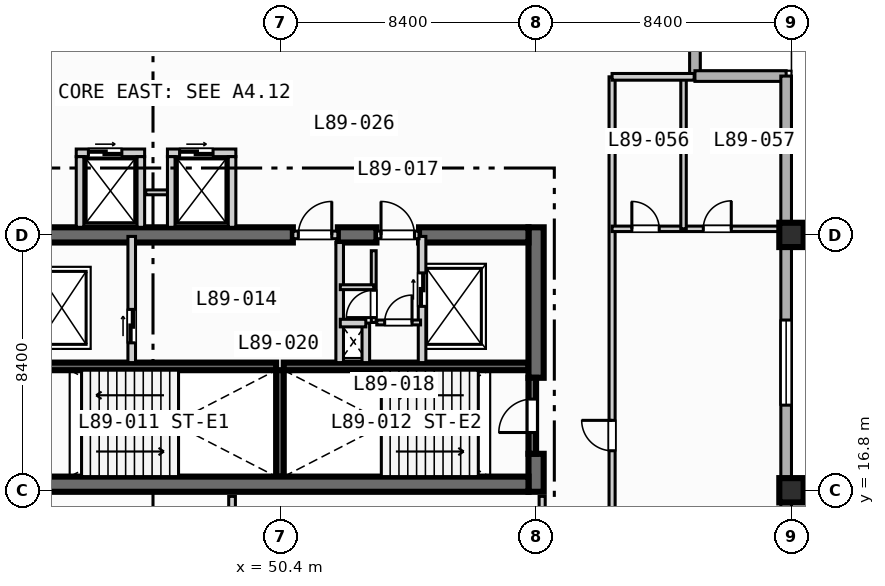
"""IFC4 building model, lengths in metres.
Left out: names, types, materials, properties, quantities, classifications, styles, units other than length and angle.
Written with IfcOpenShell. Run it as: python <this file> out.ifc"""

import sys

from ifc_helpers import new_model, si_unit, direction, frame, frame_2d, origin, origin_2d, place, context, subcontext, project, spatial, rectangle, extrude, element, fill, save


model = new_model("IFC4")
c1 = context("Model", 3, precision=1e-05, world=origin(), true_north=direction((0.0, 1.0)))
c2 = subcontext(c1, "Body", "Model", "MODEL_VIEW")
j1 = project(units=[si_unit("LENGTHUNIT", "METRE"), si_unit("PLANEANGLEUNIT", "RADIAN")], contexts=[c1])
p1 = place(None, origin())
s1 = spatial("IfcSite", under=j1, at=p1, CompositionType="ELEMENT")
p2 = place(p1, origin())
s2 = spatial("IfcBuilding", under=s1, at=p2, CompositionType="ELEMENT")
p3 = place(p2, frame((0.0, 0.0, 359.6)))
s3 = spatial("IfcBuildingStorey", under=s2, at=p3, CompositionType="ELEMENT", Elevation=359.6)
for number, where, z_axis, x_axis in (
    (1, (42.2, 20.875, 0.0), (0.0, 0.0, 1.0), (1.0, 0.0, 0.0)),
    (2, (50.5, 20.875, 0.0), (0.0, 0.0, 1.0), (1.0, 0.0, 0.0)),
):
    element("IfcWall", number, at=place(p3, frame(where, z_axis=z_axis, x_axis=x_axis)), inside=s3, PredefinedType="SOLIDWALL", context=c2, shape_type="SweptSolid", body=[
        extrude(rectangle(XDim=8.05, YDim=0.25, at=frame_2d((4.025, 0.0))), origin(), (0.0, 0.0, 1.0), 3.9),
    ])
p4 = place(p3, frame((50.375, 17.25, 0.0), z_axis=(0.0, 0.0, 1.0), x_axis=(0.0, 1.0, 0.0)))
e3 = element("IfcWall", 3, at=p4, inside=s3, PredefinedType="SOLIDWALL", context=c2, shape_type="SweptSolid", body=[
    extrude(rectangle(XDim=3.5, YDim=0.25, at=frame_2d((1.75, 0.0))), origin(), (0.0, 0.0, 1.0), 3.9),
])
p5 = place(p3, frame((58.8, 16.75, 0.0), z_axis=(0.0, 0.0, 1.0), x_axis=(0.0, 1.0, 0.0)))
e4 = element("IfcWall", 4, at=p5, inside=s3, PredefinedType="SHEAR", context=c2, shape_type="SweptSolid", body=[
    extrude(rectangle(XDim=1.25, YDim=0.5, at=frame_2d((0.625, 0.0))), origin(), (0.0, 0.0, 1.0), 3.9),
])
p6 = place(p3, frame((58.8, 20.5, 0.0), z_axis=(0.0, 0.0, 1.0), x_axis=(0.0, 1.0, 0.0)))
e5 = element("IfcWall", 5, at=p6, inside=s3, PredefinedType="SHEAR", context=c2, shape_type="SweptSolid", body=[
    extrude(rectangle(XDim=4.95, YDim=0.5, at=frame_2d((2.475, 0.0))), origin(), (0.0, 0.0, 1.0), 3.9),
])
p7 = place(p3, frame((42.2, 17.0, 0.0), z_axis=(0.0, 0.0, 1.0), x_axis=(1.0, 0.0, 0.0)))
e6 = element("IfcWall", 6, at=p7, inside=s3, PredefinedType="SHEAR", context=c2, shape_type="SweptSolid", body=[
    extrude(rectangle(XDim=16.35, YDim=0.5, at=frame_2d((8.175, 0.0))), origin(), (0.0, 0.0, 1.0), 3.9),
])
p8 = place(p3, frame((42.2, 25.2, 0.0), z_axis=(0.0, 0.0, 1.0), x_axis=(1.0, 0.0, 0.0)))
e7 = element("IfcWall", 7, at=p8, inside=s3, PredefinedType="SHEAR", context=c2, shape_type="SweptSolid", body=[
    extrude(rectangle(XDim=8.6, YDim=0.5, at=frame_2d((4.3, 0.0))), origin(), (0.0, 0.0, 1.0), 3.9),
])
p9 = place(p3, frame((52.28, 25.2, 0.0), z_axis=(0.0, 0.0, 1.0), x_axis=(1.0, 0.0, 0.0)))
e8 = element("IfcWall", 8, at=p9, inside=s3, PredefinedType="SHEAR", context=c2, shape_type="SweptSolid", body=[
    extrude(rectangle(XDim=1.27, YDim=0.5, at=frame_2d((0.635, 0.0))), origin(), (0.0, 0.0, 1.0), 3.9),
])
p10 = place(p3, frame((54.95, 25.2, 0.0), z_axis=(0.0, 0.0, 1.0), x_axis=(1.0, 0.0, 0.0)))
e9 = element("IfcWall", 9, at=p10, inside=s3, PredefinedType="SHEAR", context=c2, shape_type="SweptSolid", body=[
    extrude(rectangle(XDim=3.6, YDim=0.5, at=frame_2d((1.8, 0.0))), origin(), (0.0, 0.0, 1.0), 3.9),
])
for number, where, z_axis, x_axis in (
    (10, (67.2, 16.8, 0.0), (0.0, 0.0, 1.0), (1.0, 0.0, 0.0)),
    (11, (67.2, 25.2, 0.0), (0.0, 0.0, 1.0), (1.0, 0.0, 0.0)),
):
    element("IfcColumn", number, at=place(p3, frame(where, z_axis=z_axis, x_axis=x_axis)), inside=s3, PredefinedType="COLUMN", context=c2, shape_type="SweptSolid", body=[
        extrude(rectangle(XDim=0.8, YDim=0.8, at=origin_2d()), origin(), (0.0, 0.0, 1.0), 4.2),
    ])
for number, where, z_axis, x_axis in (
    (12, (64.025, 33.425, 0.0), (0.0, 0.0, 1.0), (0.0, -1.0, 0.0)),
    (13, (64.025, 30.425, 0.0), (0.0, 0.0, 1.0), (1.0, 0.0, 0.0)),
):
    element("IfcWall", number, at=place(p3, frame(where, z_axis=z_axis, x_axis=x_axis)), inside=s3, PredefinedType="STANDARD", context=c2, shape_type="SweptSolid", body=[
        extrude(rectangle(XDim=3.0, YDim=0.35, at=frame_2d((1.5, 0.0))), origin(), (0.0, 0.0, 1.0), 3.9),
    ])
p11 = place(p3, frame((67.025, 30.425, 0.0), z_axis=(0.0, 0.0, 1.0), x_axis=(0.0, -1.0, 0.0)))
e14 = element("IfcWall", 14, at=p11, inside=s3, PredefinedType="STANDARD", context=c2, shape_type="SweptSolid", body=[
    extrude(rectangle(XDim=18.85, YDim=0.35, at=frame_2d((9.425, 0.0))), origin(), (0.0, 0.0, 1.0), 3.3),
])
p12 = place(p11, frame((8.025, 0.0, 0.85)))
e15 = element("IfcOpeningElement", 15, at=p12, cuts=e14, PredefinedType="OPENING", context=c2, shape_type="SweptSolid", body=[
    extrude(rectangle(XDim=2.8, YDim=2.1, at=frame_2d((1.4, 1.05))), frame((0.0, 0.185, 0.0), z_axis=(0.0, -1.0, 0.0), x_axis=(1.0, 0.0, 0.0)), (0.0, 0.0, 1.0), 0.37),
])
p13 = place(p3, frame((58.675, 18.0, 0.0), z_axis=(0.0, 0.0, 1.0), x_axis=(0.0, 1.0, 0.0)))
e16 = element("IfcWall", 16, at=p13, inside=s3, PredefinedType="SOLIDWALL", context=c2, shape_type="SweptSolid", body=[
    extrude(rectangle(XDim=2.5, YDim=0.25, at=frame_2d((1.25, 0.0))), origin(), (0.0, 0.0, 1.0), 3.9),
])
p14 = place(p13, frame((0.7, 0.0, 0.0)))
e17 = element("IfcOpeningElement", 17, at=p14, cuts=e16, PredefinedType="OPENING", context=c2, shape_type="SweptSolid", body=[
    extrude(rectangle(XDim=1.1, YDim=2.15, at=frame_2d((0.55, 1.075))), frame((0.0, 0.135, 0.0), z_axis=(0.0, -1.0, 0.0), x_axis=(1.0, 0.0, 0.0)), (0.0, 0.0, 1.0), 0.27),
])
p15 = place(p3, frame((45.5, 21.0, 0.0), z_axis=(0.0, 0.0, 1.0), x_axis=(0.0, 1.0, 0.0)))
e18 = element("IfcWall", 18, at=p15, inside=s3, PredefinedType="SOLIDWALL", context=c2, shape_type="SweptSolid", body=[
    extrude(rectangle(XDim=4.15, YDim=0.25, at=frame_2d((2.075, 0.0))), origin(), (0.0, 0.0, 1.0), 3.9),
])
p16 = place(p15, frame((0.65, 0.0, 0.0)))
e19 = element("IfcOpeningElement", 19, at=p16, cuts=e18, PredefinedType="OPENING", context=c2, shape_type="SweptSolid", body=[
    extrude(rectangle(XDim=1.1, YDim=2.15, at=frame_2d((0.55, 1.075))), frame((0.0, 0.135, 0.0), z_axis=(0.0, -1.0, 0.0), x_axis=(1.0, 0.0, 0.0)), (0.0, 0.0, 1.0), 0.27),
])
p17 = place(p3, frame((50.8, 25.2, 0.0), z_axis=(0.0, 0.0, 1.0), x_axis=(1.0, 0.0, 0.0)))
e20 = element("IfcWall", 20, at=p17, inside=s3, PredefinedType="SOLIDWALL", context=c2, shape_type="SweptSolid", body=[
    extrude(rectangle(XDim=1.48, YDim=0.25, at=frame_2d((0.74, 0.0))), origin(), (0.0, 0.0, 1.0), 3.9),
])
p18 = place(p17, frame((0.18, 0.0, 0.0)))
e21 = element("IfcOpeningElement", 21, at=p18, cuts=e20, PredefinedType="OPENING", context=c2, shape_type="SweptSolid", body=[
    extrude(rectangle(XDim=1.1, YDim=2.15, at=frame_2d((0.55, 1.075))), frame((0.0, 0.135, 0.0), z_axis=(0.0, -1.0, 0.0), x_axis=(1.0, 0.0, 0.0)), (0.0, 0.0, 1.0), 0.27),
])
p19 = place(p3, frame((52.34, 21.0, 0.0), z_axis=(0.0, 0.0, 1.0), x_axis=(0.0, 1.0, 0.0)))
e22 = element("IfcWall", 22, at=p19, inside=s3, PredefinedType="SOLIDWALL", context=c2, shape_type="SweptSolid", body=[
    extrude(rectangle(XDim=3.95, YDim=0.25, at=frame_2d((1.975, 0.0))), origin(), (0.0, 0.0, 1.0), 3.9),
])
p20 = place(p3, frame((55.05, 21.0, 0.0), z_axis=(0.0, 0.0, 1.0), x_axis=(0.0, 1.0, 0.0)))
e23 = element("IfcWall", 23, at=p20, inside=s3, PredefinedType="SOLIDWALL", context=c2, shape_type="SweptSolid", body=[
    extrude(rectangle(XDim=4.15, YDim=0.25, at=frame_2d((2.075, 0.0))), origin(), (0.0, 0.0, 1.0), 3.9),
])
p21 = place(p20, frame((1.85, 0.0, 0.0)))
e24 = element("IfcOpeningElement", 24, at=p21, cuts=e23, PredefinedType="OPENING", context=c2, shape_type="SweptSolid", body=[
    extrude(rectangle(XDim=1.1, YDim=2.15, at=frame_2d((0.55, 1.075))), frame((0.0, 0.135, 0.0), z_axis=(0.0, -1.0, 0.0), x_axis=(1.0, 0.0, 0.0)), (0.0, 0.0, 1.0), 0.27),
])
p22 = place(p3, frame((53.55, 25.2, 0.0), z_axis=(0.0, 0.0, 1.0), x_axis=(1.0, 0.0, 0.0)))
e25 = element("IfcWall", 25, at=p22, inside=s3, PredefinedType="SOLIDWALL", context=c2, shape_type="SweptSolid", body=[
    extrude(rectangle(XDim=1.4, YDim=0.25, at=frame_2d((0.7, 0.0))), origin(), (0.0, 0.0, 1.0), 3.9),
])
p23 = place(p22, frame((0.15, 0.0, 0.0)))
e26 = element("IfcOpeningElement", 26, at=p23, cuts=e25, PredefinedType="OPENING", context=c2, shape_type="SweptSolid", body=[
    extrude(rectangle(XDim=1.1, YDim=2.15, at=frame_2d((0.55, 1.075))), frame((0.0, 0.135, 0.0), z_axis=(0.0, -1.0, 0.0), x_axis=(1.0, 0.0, 0.0)), (0.0, 0.0, 1.0), 0.27),
])
p24 = place(p3, frame((53.2, 21.0, 0.0), z_axis=(0.0, 0.0, 1.0), x_axis=(0.0, 1.0, 0.0)))
e27 = element("IfcWall", 27, at=p24, inside=s3, PredefinedType="SOLIDWALL", context=c2, shape_type="SweptSolid", body=[
    extrude(rectangle(XDim=1.3, YDim=0.25, at=frame_2d((0.65, 0.0))), origin(), (0.0, 0.0, 1.0), 3.9),
])
p25 = place(p3, frame((52.36, 22.3, 0.0), z_axis=(0.0, 0.0, 1.0), x_axis=(1.0, 0.0, 0.0)))
e28 = element("IfcWall", 28, at=p25, inside=s3, PredefinedType="SOLIDWALL", context=c2, shape_type="SweptSolid", body=[
    extrude(rectangle(XDim=0.84, YDim=0.25, at=frame_2d((0.42, 0.0))), origin(), (0.0, 0.0, 1.0), 3.9),
])
p26 = place(p3, frame((53.56, 22.32, 0.0), z_axis=(0.0, 0.0, 1.0), x_axis=(1.0, 0.0, 0.0)))
e29 = element("IfcWall", 29, at=p26, inside=s3, PredefinedType="PARTITIONING", context=c2, shape_type="SweptSolid", body=[
    extrude(rectangle(XDim=1.44, YDim=0.16, at=frame_2d((0.72, 0.0))), origin(), (0.0, 0.0, 1.0), 3.9),
])
p27 = place(p26, frame((0.26, 0.0, 0.0)))
e30 = element("IfcOpeningElement", 30, at=p27, cuts=e29, PredefinedType="OPENING", context=c2, shape_type="SweptSolid", body=[
    extrude(rectangle(XDim=0.9, YDim=2.1, at=frame_2d((0.45, 1.05))), frame((0.0, 0.09, 0.0), z_axis=(0.0, -1.0, 0.0), x_axis=(1.0, 0.0, 0.0)), (0.0, 0.0, 1.0), 0.18),
])
p28 = place(p3, frame((53.46, 22.32, 0.0), z_axis=(0.0, 0.0, 1.0), x_axis=(0.0, 1.0, 0.0)))
e31 = element("IfcWall", 31, at=p28, inside=s3, PredefinedType="PARTITIONING", context=c2, shape_type="SweptSolid", body=[
    extrude(rectangle(XDim=2.36, YDim=0.16, at=frame_2d((1.18, 0.0))), origin(), (0.0, 0.0, 1.0), 3.9),
])
p29 = place(p28, frame((0.16, 0.0, 0.0)))
e32 = element("IfcOpeningElement", 32, at=p29, cuts=e31, PredefinedType="OPENING", context=c2, shape_type="SweptSolid", body=[
    extrude(rectangle(XDim=0.9, YDim=2.1, at=frame_2d((0.45, 1.05))), frame((0.0, 0.09, 0.0), z_axis=(0.0, -1.0, 0.0), x_axis=(1.0, 0.0, 0.0)), (0.0, 0.0, 1.0), 0.18),
])
p30 = place(p3, frame((52.36, 23.48, 0.0), z_axis=(0.0, 0.0, 1.0), x_axis=(1.0, 0.0, 0.0)))
e33 = element("IfcWall", 33, at=p30, inside=s3, PredefinedType="PARTITIONING", context=c2, shape_type="SweptSolid", body=[
    extrude(rectangle(XDim=1.1, YDim=0.16, at=frame_2d((0.55, 0.0))), origin(), (0.0, 0.0, 1.0), 3.9),
])
p31 = place(p3, frame((43.675, 27.9, 0.0), z_axis=(0.0, 0.0, 1.0), x_axis=(1.0, 0.0, 0.0)))
e34 = element("IfcWall", 34, at=p31, inside=s3, PredefinedType="SOLIDWALL", context=c2, shape_type="SweptSolid", body=[
    extrude(rectangle(XDim=2.25, YDim=0.25, at=frame_2d((1.125, 0.0))), origin(), (0.0, 0.0, 1.0), 3.9),
])
p32 = place(p31, frame((0.4, 0.0, 0.0)))
e35 = element("IfcOpeningElement", 35, at=p32, cuts=e34, PredefinedType="OPENING", context=c2, shape_type="SweptSolid", body=[
    extrude(rectangle(XDim=1.1, YDim=2.15, at=frame_2d((0.55, 1.075))), frame((0.0, 0.135, 0.0), z_axis=(0.0, -1.0, 0.0), x_axis=(1.0, 0.0, 0.0)), (0.0, 0.0, 1.0), 0.27),
])
for number, where, z_axis, x_axis in (
    (36, (43.8, 25.45, 0.0), (0.0, 0.0, 1.0), (0.0, 1.0, 0.0)),
    (37, (45.8, 25.45, 0.0), (0.0, 0.0, 1.0), (0.0, 1.0, 0.0)),
):
    element("IfcWall", number, at=place(p3, frame(where, z_axis=z_axis, x_axis=x_axis)), inside=s3, PredefinedType="SOLIDWALL", context=c2, shape_type="SweptSolid", body=[
        extrude(rectangle(XDim=2.325, YDim=0.25, at=frame_2d((1.163, 0.0))), origin(), (0.0, 0.0, 1.0), 3.9),
    ])
p33 = place(p3, frame((45.96, 26.6, 0.0), z_axis=(0.0, 0.0, 1.0), x_axis=(1.0, 0.0, 0.0)))
e38 = element("IfcWall", 38, at=p33, inside=s3, PredefinedType="PARTITIONING", context=c2, shape_type="SweptSolid", body=[
    extrude(rectangle(XDim=0.88, YDim=0.16, at=frame_2d((0.44, 0.0))), origin(), (0.0, 0.0, 1.0), 3.9),
])
p34 = place(p3, frame((46.675, 27.9, 0.0), z_axis=(0.0, 0.0, 1.0), x_axis=(1.0, 0.0, 0.0)))
e39 = element("IfcWall", 39, at=p34, inside=s3, PredefinedType="SOLIDWALL", context=c2, shape_type="SweptSolid", body=[
    extrude(rectangle(XDim=2.25, YDim=0.25, at=frame_2d((1.125, 0.0))), origin(), (0.0, 0.0, 1.0), 3.9),
])
p35 = place(p34, frame((0.4, 0.0, 0.0)))
e40 = element("IfcOpeningElement", 40, at=p35, cuts=e39, PredefinedType="OPENING", context=c2, shape_type="SweptSolid", body=[
    extrude(rectangle(XDim=1.1, YDim=2.15, at=frame_2d((0.55, 1.075))), frame((0.0, 0.135, 0.0), z_axis=(0.0, -1.0, 0.0), x_axis=(1.0, 0.0, 0.0)), (0.0, 0.0, 1.0), 0.27),
])
for number, where, z_axis, x_axis in (
    (41, (46.8, 25.45, 0.0), (0.0, 0.0, 1.0), (0.0, 1.0, 0.0)),
    (42, (48.8, 25.45, 0.0), (0.0, 0.0, 1.0), (0.0, 1.0, 0.0)),
):
    element("IfcWall", number, at=place(p3, frame(where, z_axis=z_axis, x_axis=x_axis)), inside=s3, PredefinedType="SOLIDWALL", context=c2, shape_type="SweptSolid", body=[
        extrude(rectangle(XDim=2.325, YDim=0.25, at=frame_2d((1.163, 0.0))), origin(), (0.0, 0.0, 1.0), 3.9),
    ])
p36 = place(p3, frame((59.0, 8.65, 0.0), z_axis=(0.0, 0.0, 1.0), x_axis=(0.0, 1.0, 0.0)))
e43 = element("IfcWall", 43, at=p36, inside=s3, PredefinedType="PARTITIONING", context=c2, shape_type="SweptSolid", body=[
    extrude(rectangle(XDim=7.95, YDim=0.2, at=frame_2d((3.975, 0.0))), origin(), (0.0, 0.0, 1.0), 3.3),
])
p37 = place(p36, frame((2.2, 0.0, 0.0)))
e44 = element("IfcOpeningElement", 44, at=p37, cuts=e43, PredefinedType="OPENING", context=c2, shape_type="SweptSolid", body=[
    extrude(rectangle(XDim=0.92, YDim=2.1, at=frame_2d((0.46, 1.05))), frame((0.0, 0.11, 0.0), z_axis=(0.0, -1.0, 0.0), x_axis=(1.0, 0.0, 0.0)), (0.0, 0.0, 1.0), 0.22),
])
p38 = place(p3, frame((48.8, 8.65, 0.0), z_axis=(0.0, 0.0, 1.0), x_axis=(0.0, 1.0, 0.0)))
e45 = element("IfcWall", 45, at=p38, inside=s3, PredefinedType="PARTITIONING", context=c2, shape_type="SweptSolid", body=[
    extrude(rectangle(XDim=7.95, YDim=0.22, at=frame_2d((3.975, 0.0))), origin(), (0.0, 0.0, 1.0), 3.9),
])
p39 = place(p3, frame((61.3, 11.6, 0.0), z_axis=(0.0, 0.0, 1.0), x_axis=(0.0, 1.0, 0.0)))
e46 = element("IfcWall", 46, at=p39, inside=s3, PredefinedType="PARTITIONING", context=c2, shape_type="SweptSolid", body=[
    extrude(rectangle(XDim=18.8, YDim=0.2, at=frame_2d((9.4, 0.0))), origin(), (0.0, 0.0, 1.0), 3.9),
])
p40 = place(p39, frame((6.5, 0.0, 0.0)))
e47 = element("IfcOpeningElement", 47, at=p40, cuts=e46, PredefinedType="OPENING", context=c2, shape_type="SweptSolid", body=[
    extrude(rectangle(XDim=1.0, YDim=2.15, at=frame_2d((0.5, 1.075))), frame((0.0, 0.11, 0.0), z_axis=(0.0, -1.0, 0.0), x_axis=(1.0, 0.0, 0.0)), (0.0, 0.0, 1.0), 0.22),
])
p41 = place(p3, frame((61.3, 25.4, 0.0), z_axis=(0.0, 0.0, 1.0), x_axis=(1.0, 0.0, 0.0)))
e48 = element("IfcWall", 48, at=p41, inside=s3, PredefinedType="PLUMBINGWALL", context=c2, shape_type="SweptSolid", body=[
    extrude(rectangle(XDim=5.5, YDim=0.18, at=frame_2d((2.75, 0.0))), origin(), (0.0, 0.0, 1.0), 2.9),
])
p42 = place(p41, frame((0.65, 0.0, 0.0)))
e49 = element("IfcOpeningElement", 49, at=p42, cuts=e48, PredefinedType="OPENING", context=c2, shape_type="SweptSolid", body=[
    extrude(rectangle(XDim=0.9, YDim=2.1, at=frame_2d((0.45, 1.05))), frame((0.0, 0.1, 0.0), z_axis=(0.0, -1.0, 0.0), x_axis=(1.0, 0.0, 0.0)), (0.0, 0.0, 1.0), 0.2),
])
p43 = place(p41, frame((3.0, 0.0, 0.0)))
e50 = element("IfcOpeningElement", 50, at=p43, cuts=e48, PredefinedType="OPENING", context=c2, shape_type="SweptSolid", body=[
    extrude(rectangle(XDim=0.92, YDim=2.1, at=frame_2d((0.46, 1.05))), frame((0.0, 0.1, 0.0), z_axis=(0.0, -1.0, 0.0), x_axis=(1.0, 0.0, 0.0)), (0.0, 0.0, 1.0), 0.2),
])
p44 = place(p3, frame((63.65, 25.4, 0.0), z_axis=(0.0, 0.0, 1.0), x_axis=(0.0, 1.0, 0.0)))
e51 = element("IfcWall", 51, at=p44, inside=s3, PredefinedType="PLUMBINGWALL", context=c2, shape_type="SweptSolid", body=[
    extrude(rectangle(XDim=5.0, YDim=0.18, at=frame_2d((2.5, 0.0))), origin(), (0.0, 0.0, 1.0), 3.9),
])
p45 = place(p3, frame((61.3, 30.4, 0.0), z_axis=(0.0, 0.0, 1.0), x_axis=(1.0, 0.0, 0.0)))
e52 = element("IfcWall", 52, at=p45, inside=s3, PredefinedType="PARTITIONING", context=c2, shape_type="SweptSolid", body=[
    extrude(rectangle(XDim=2.7, YDim=0.22, at=frame_2d((1.35, 0.0))), origin(), (0.0, 0.0, 1.0), 3.9),
])
p46 = place(p12, origin())
e53 = element("IfcWindow", 53, at=p46, inside=s3, PartitioningType="SINGLE_PANEL", PredefinedType="WINDOW", context=c2, shape_type="SweptSolid", body=[
    extrude(rectangle(XDim=2.8, YDim=2.1, at=frame_2d((1.4, 1.05))), frame((0.0, 0.03, 0.0), z_axis=(0.0, -1.0, 0.0), x_axis=(1.0, 0.0, 0.0)), (0.0, 0.0, 1.0), 0.06),
])
fill(e15, e53)
p47 = place(p14, origin())
e54 = element("IfcDoor", 54, at=p47, inside=s3, OperationType="SINGLE_SWING_LEFT", PredefinedType="DOOR", context=c2, shape_type="SweptSolid", body=[
    extrude(rectangle(XDim=1.1, YDim=2.15, at=frame_2d((0.55, 1.075))), frame((0.0, 0.025, 0.0), z_axis=(0.0, -1.0, 0.0), x_axis=(1.0, 0.0, 0.0)), (0.0, 0.0, 1.0), 0.05),
])
fill(e17, e54)
p48 = place(p16, origin())
e55 = element("IfcDoor", 55, at=p48, inside=s3, OperationType="SLIDING_TO_LEFT", PredefinedType="DOOR", context=c2, shape_type="SweptSolid", body=[
    extrude(rectangle(XDim=1.1, YDim=2.15, at=frame_2d((0.55, 1.075))), frame((0.0, 0.025, 0.0), z_axis=(0.0, -1.0, 0.0), x_axis=(1.0, 0.0, 0.0)), (0.0, 0.0, 1.0), 0.05),
])
fill(e19, e55)
p49 = place(p18, origin())
e56 = element("IfcDoor", 56, at=p49, inside=s3, OperationType="SINGLE_SWING_RIGHT", PredefinedType="DOOR", context=c2, shape_type="SweptSolid", body=[
    extrude(rectangle(XDim=1.1, YDim=2.15, at=frame_2d((0.55, 1.075))), frame((0.0, 0.025, 0.0), z_axis=(0.0, -1.0, 0.0), x_axis=(1.0, 0.0, 0.0)), (0.0, 0.0, 1.0), 0.05),
])
fill(e21, e56)
p50 = place(p21, origin())
e57 = element("IfcDoor", 57, at=p50, inside=s3, OperationType="SLIDING_TO_LEFT", PredefinedType="DOOR", context=c2, shape_type="SweptSolid", body=[
    extrude(rectangle(XDim=1.1, YDim=2.15, at=frame_2d((0.55, 1.075))), frame((0.0, 0.025, 0.0), z_axis=(0.0, -1.0, 0.0), x_axis=(1.0, 0.0, 0.0)), (0.0, 0.0, 1.0), 0.05),
])
fill(e24, e57)
p51 = place(p23, origin())
e58 = element("IfcDoor", 58, at=p51, inside=s3, OperationType="SINGLE_SWING_LEFT", PredefinedType="DOOR", context=c2, shape_type="SweptSolid", body=[
    extrude(rectangle(XDim=1.1, YDim=2.15, at=frame_2d((0.55, 1.075))), frame((0.0, 0.025, 0.0), z_axis=(0.0, -1.0, 0.0), x_axis=(1.0, 0.0, 0.0)), (0.0, 0.0, 1.0), 0.05),
])
fill(e26, e58)
p52 = place(p27, origin())
e59 = element("IfcDoor", 59, at=p52, inside=s3, OperationType="SINGLE_SWING_RIGHT", PredefinedType="DOOR", context=c2, shape_type="SweptSolid", body=[
    extrude(rectangle(XDim=0.9, YDim=2.1, at=frame_2d((0.45, 1.05))), frame((0.0, 0.025, 0.0), z_axis=(0.0, -1.0, 0.0), x_axis=(1.0, 0.0, 0.0)), (0.0, 0.0, 1.0), 0.05),
])
fill(e30, e59)
p53 = place(p29, origin())
e60 = element("IfcDoor", 60, at=p53, inside=s3, OperationType="SINGLE_SWING_LEFT", PredefinedType="DOOR", context=c2, shape_type="SweptSolid", body=[
    extrude(rectangle(XDim=0.9, YDim=2.1, at=frame_2d((0.45, 1.05))), frame((0.0, 0.025, 0.0), z_axis=(0.0, -1.0, 0.0), x_axis=(1.0, 0.0, 0.0)), (0.0, 0.0, 1.0), 0.05),
])
fill(e32, e60)
p54 = place(p32, origin())
e61 = element("IfcDoor", 61, at=p54, inside=s3, OperationType="SLIDING_TO_LEFT", PredefinedType="DOOR", context=c2, shape_type="SweptSolid", body=[
    extrude(rectangle(XDim=1.1, YDim=2.15, at=frame_2d((0.55, 1.075))), frame((0.0, 0.025, 0.0), z_axis=(0.0, -1.0, 0.0), x_axis=(1.0, 0.0, 0.0)), (0.0, 0.0, 1.0), 0.05),
])
fill(e35, e61)
p55 = place(p35, origin())
e62 = element("IfcDoor", 62, at=p55, inside=s3, OperationType="SLIDING_TO_LEFT", PredefinedType="DOOR", context=c2, shape_type="SweptSolid", body=[
    extrude(rectangle(XDim=1.1, YDim=2.15, at=frame_2d((0.55, 1.075))), frame((0.0, 0.025, 0.0), z_axis=(0.0, -1.0, 0.0), x_axis=(1.0, 0.0, 0.0)), (0.0, 0.0, 1.0), 0.05),
])
fill(e40, e62)
p56 = place(p40, origin())
e63 = element("IfcDoor", 63, at=p56, inside=s3, OperationType="SINGLE_SWING_RIGHT", PredefinedType="DOOR", context=c2, shape_type="SweptSolid", body=[
    extrude(rectangle(XDim=1.0, YDim=2.15, at=frame_2d((0.5, 1.075))), frame((0.0, 0.025, 0.0), z_axis=(0.0, -1.0, 0.0), x_axis=(1.0, 0.0, 0.0)), (0.0, 0.0, 1.0), 0.05),
])
fill(e47, e63)
p57 = place(p42, origin())
e64 = element("IfcDoor", 64, at=p57, inside=s3, OperationType="SINGLE_SWING_LEFT", PredefinedType="DOOR", context=c2, shape_type="SweptSolid", body=[
    extrude(rectangle(XDim=0.9, YDim=2.1, at=frame_2d((0.45, 1.05))), frame((0.0, 0.025, 0.0), z_axis=(0.0, -1.0, 0.0), x_axis=(1.0, 0.0, 0.0)), (0.0, 0.0, 1.0), 0.05),
])
fill(e49, e64)
p58 = place(p43, origin())
e65 = element("IfcDoor", 65, at=p58, inside=s3, OperationType="SINGLE_SWING_RIGHT", PredefinedType="DOOR", context=c2, shape_type="SweptSolid", body=[
    extrude(rectangle(XDim=0.92, YDim=2.1, at=frame_2d((0.46, 1.05))), frame((0.0, 0.025, 0.0), z_axis=(0.0, -1.0, 0.0), x_axis=(1.0, 0.0, 0.0)), (0.0, 0.0, 1.0), 0.05),
])
fill(e50, e65)
save(model, sys.argv[1])
